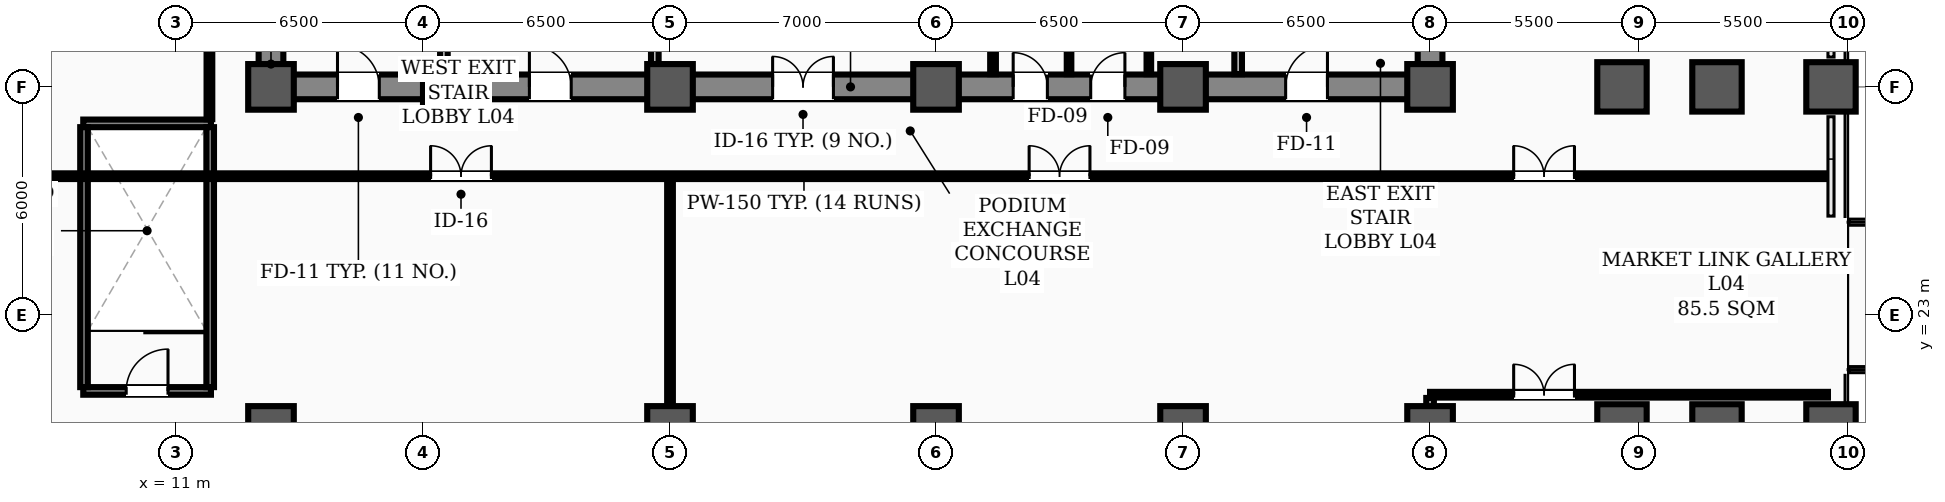
"""IFC4 building model, lengths in metres.
Left out: names, types, materials, properties, quantities, classifications, styles, units other than length and angle.
Written with IfcOpenShell. Run it as: python <this file> out.ifc"""

import sys

from ifc_helpers import new_model, si_unit, direction, frame, frame_2d, origin, origin_2d, place, context, subcontext, project, spatial, rectangle, hollow_rectangle, extrude, element, fill, save


model = new_model("IFC4")
c1 = context("Model", 3, precision=1e-05, world=origin(), true_north=direction((0.0, 1.0)))
c2 = subcontext(c1, "Body", "Model", "MODEL_VIEW")
j1 = project(units=[si_unit("LENGTHUNIT", "METRE"), si_unit("PLANEANGLEUNIT", "RADIAN")], contexts=[c1])
p1 = place(None, origin())
s1 = spatial("IfcSite", under=j1, at=p1, CompositionType="ELEMENT")
p2 = place(p1, origin())
s2 = spatial("IfcBuilding", under=s1, at=p2, CompositionType="ELEMENT")
p3 = place(p2, frame((0.0, 0.0, 16.6)))
s3 = spatial("IfcBuildingStorey", under=s2, at=p3, CompositionType="ELEMENT", Elevation=16.6)
for number, where, z_axis, x_axis in (
    (1, (13.5, 29.0, 0.0), (0.0, 0.0, 1.0), (1.0, 0.0, 0.0)),
    (2, (18.1, 29.0, 0.0), (0.0, 0.0, 1.0), (1.0, 0.0, 0.0)),
    (3, (24.0, 29.0, 0.0), (0.0, 0.0, 1.0), (1.0, 0.0, 0.0)),
    (4, (31.0, 29.0, 0.0), (0.0, 0.0, 1.0), (1.0, 0.0, 0.0)),
    (5, (37.5, 29.0, 0.0), (0.0, 0.0, 1.0), (1.0, 0.0, 0.0)),
    (6, (44.0, 29.0, 0.0), (0.0, 0.0, 1.0), (1.0, 0.0, 0.0)),
    (7, (13.5, 20.0, 0.0), (0.0, 0.0, 1.0), (1.0, 0.0, 0.0)),
    (8, (24.0, 20.0, 0.0), (0.0, 0.0, 1.0), (1.0, 0.0, 0.0)),
    (9, (31.0, 20.0, 0.0), (0.0, 0.0, 1.0), (1.0, 0.0, 0.0)),
    (10, (37.5, 20.0, 0.0), (0.0, 0.0, 1.0), (1.0, 0.0, 0.0)),
    (11, (44.0, 20.0, 0.0), (0.0, 0.0, 1.0), (1.0, 0.0, 0.0)),
):
    element("IfcColumn", number, at=place(p3, frame(where, z_axis=z_axis, x_axis=x_axis)), inside=s3, PredefinedType="COLUMN", context=c2, shape_type="SweptSolid", body=[
        extrude(hollow_rectangle(XDim=1.2, YDim=1.2, WallThickness=0.04, InnerFilletRadius=0.02, OuterFilletRadius=0.06, at=origin_2d()), origin(), (0.0, 0.0, 1.0), 5.4),
    ])
for number, where, z_axis, x_axis in (
    (12, (49.05, 20.0, 0.0), (0.0, 0.0, 1.0), (1.0, 0.0, 0.0)),
    (13, (49.05, 29.0, 0.0), (0.0, 0.0, 1.0), (1.0, 0.0, 0.0)),
    (14, (51.55, 20.0, 0.0), (0.0, 0.0, 1.0), (1.0, 0.0, 0.0)),
    (15, (51.55, 29.0, 0.0), (0.0, 0.0, 1.0), (1.0, 0.0, 0.0)),
):
    element("IfcColumn", number, at=place(p3, frame(where, z_axis=z_axis, x_axis=x_axis)), inside=s3, PredefinedType="COLUMN", context=c2, shape_type="SweptSolid", body=[
        extrude(rectangle(XDim=1.3, YDim=1.3, at=origin_2d()), origin(), (0.0, 0.0, 1.0), 5.4),
    ])
for number, where, z_axis, x_axis in (
    (16, (54.55, 20.0, 0.0), (0.0, 0.0, 1.0), (1.0, 0.0, 0.0)),
    (17, (54.55, 29.0, 0.0), (0.0, 0.0, 1.0), (1.0, 0.0, 0.0)),
):
    element("IfcColumn", number, at=place(p3, frame(where, z_axis=z_axis, x_axis=x_axis)), inside=s3, PredefinedType="COLUMN", context=c2, shape_type="SweptSolid", body=[
        extrude(rectangle(XDim=1.3, YDim=1.3, at=origin_2d()), origin(), (0.0, 0.0, 1.0), 5.16),
    ])
p4 = place(p3, frame((13.5, 29.0, 0.0), z_axis=(0.0, 0.0, 1.0), x_axis=(1.0, 0.0, 0.0)))
e18 = element("IfcWall", 18, at=p4, inside=s3, PredefinedType="SHEAR", context=c2, shape_type="SweptSolid", body=[
    extrude(rectangle(XDim=30.5, YDim=0.65, at=frame_2d((15.25, 0.0))), origin(), (0.0, 0.0, 1.0), 5.16),
])
p5 = place(p4, frame((1.75, 0.0, 0.0)))
e19 = element("IfcOpeningElement", 19, at=p5, cuts=e18, PredefinedType="OPENING", context=c2, shape_type="SweptSolid", body=[
    extrude(rectangle(XDim=1.1, YDim=2.08, at=frame_2d((0.55, 1.04))), frame((0.0, 0.335, 0.0), z_axis=(0.0, -1.0, 0.0), x_axis=(1.0, 0.0, 0.0)), (0.0, 0.0, 1.0), 0.67),
])
p6 = place(p4, frame((26.7, 0.0, 0.0)))
e20 = element("IfcOpeningElement", 20, at=p6, cuts=e18, PredefinedType="OPENING", context=c2, shape_type="SweptSolid", body=[
    extrude(rectangle(XDim=1.1, YDim=2.08, at=frame_2d((0.55, 1.04))), frame((0.0, 0.335, 0.0), z_axis=(0.0, -1.0, 0.0), x_axis=(1.0, 0.0, 0.0)), (0.0, 0.0, 1.0), 0.67),
])
p7 = place(p4, frame((6.8, 0.0, 0.0)))
e21 = element("IfcOpeningElement", 21, at=p7, cuts=e18, PredefinedType="OPENING", context=c2, shape_type="SweptSolid", body=[
    extrude(rectangle(XDim=1.1, YDim=2.08, at=frame_2d((0.55, 1.04))), frame((0.0, 0.335, 0.0), z_axis=(0.0, -1.0, 0.0), x_axis=(1.0, 0.0, 0.0)), (0.0, 0.0, 1.0), 0.67),
])
p8 = place(p4, frame((13.2, 0.0, 0.0)))
e22 = element("IfcOpeningElement", 22, at=p8, cuts=e18, PredefinedType="OPENING", context=c2, shape_type="SweptSolid", body=[
    extrude(rectangle(XDim=1.6, YDim=2.08, at=frame_2d((0.8, 1.04))), frame((0.0, 0.335, 0.0), z_axis=(0.0, -1.0, 0.0), x_axis=(1.0, 0.0, 0.0)), (0.0, 0.0, 1.0), 0.67),
])
p9 = place(p4, frame((19.53, 0.0, 0.0)))
e23 = element("IfcOpeningElement", 23, at=p9, cuts=e18, PredefinedType="OPENING", context=c2, shape_type="SweptSolid", body=[
    extrude(rectangle(XDim=0.9, YDim=2.08, at=frame_2d((0.45, 1.04))), frame((0.0, 0.335, 0.0), z_axis=(0.0, -1.0, 0.0), x_axis=(1.0, 0.0, 0.0)), (0.0, 0.0, 1.0), 0.67),
])
p10 = place(p4, frame((21.57, 0.0, 0.0)))
e24 = element("IfcOpeningElement", 24, at=p10, cuts=e18, PredefinedType="OPENING", context=c2, shape_type="SweptSolid", body=[
    extrude(rectangle(XDim=0.9, YDim=2.08, at=frame_2d((0.45, 1.04))), frame((0.0, 0.335, 0.0), z_axis=(0.0, -1.0, 0.0), x_axis=(1.0, 0.0, 0.0)), (0.0, 0.0, 1.0), 0.67),
])
for number, where, z_axis, x_axis in (
    (25, (13.5, 29.35, 0.0), (0.0, 0.0, 1.0), (0.0, 1.0, 0.0)),
    (26, (44.0, 29.35, 0.0), (0.0, 0.0, 1.0), (0.0, 1.0, 0.0)),
):
    element("IfcWall", number, at=place(p3, frame(where, z_axis=z_axis, x_axis=x_axis)), inside=s3, PredefinedType="SHEAR", context=c2, shape_type="SweptSolid", body=[
        extrude(rectangle(XDim=8.6, YDim=0.65, at=frame_2d((4.3, 0.0))), origin(), (0.0, 0.0, 1.0), 5.16),
    ])
p11 = place(p3, frame((8.56, 21.0, 0.0), z_axis=(0.0, 0.0, 1.0), x_axis=(1.0, 0.0, 0.0)))
e27 = element("IfcWall", 27, at=p11, inside=s3, PredefinedType="STANDARD", context=c2, shape_type="SweptSolid", body=[
    extrude(rectangle(XDim=3.36, YDim=0.2, at=frame_2d((1.68, 0.0))), origin(), (0.0, 0.0, 1.0), 5.16),
])
p12 = place(p11, frame((1.13, 0.0, 0.0)))
e28 = element("IfcOpeningElement", 28, at=p12, cuts=e27, PredefinedType="OPENING", context=c2, shape_type="SweptSolid", body=[
    extrude(rectangle(XDim=1.1, YDim=2.08, at=frame_2d((0.55, 1.04))), frame((0.0, 0.11, 0.0), z_axis=(0.0, -1.0, 0.0), x_axis=(1.0, 0.0, 0.0)), (0.0, 0.0, 1.0), 0.22),
])
p13 = place(p3, frame((8.56, 28.04, 0.0), z_axis=(0.0, 0.0, 1.0), x_axis=(1.0, 0.0, 0.0)))
e29 = element("IfcWall", 29, at=p13, inside=s3, PredefinedType="STANDARD", context=c2, shape_type="SweptSolid", body=[
    extrude(rectangle(XDim=3.36, YDim=0.2, at=frame_2d((1.68, 0.0))), origin(), (0.0, 0.0, 1.0), 5.16),
])
for number, where, z_axis, x_axis in (
    (30, (8.58, 21.1, 0.0), (0.0, 0.0, 1.0), (0.0, 1.0, 0.0)),
    (31, (11.9, 21.1, 0.0), (0.0, 0.0, 1.0), (0.0, 1.0, 0.0)),
):
    element("IfcWall", number, at=place(p3, frame(where, z_axis=z_axis, x_axis=x_axis)), inside=s3, PredefinedType="STANDARD", context=c2, shape_type="SweptSolid", body=[
        extrude(rectangle(XDim=6.84, YDim=0.2, at=frame_2d((3.42, 0.0))), origin(), (0.0, 0.0, 1.0), 5.16),
    ])
p14 = place(p3, frame((0.58, 26.65, 0.0), z_axis=(0.0, 0.0, 1.0), x_axis=(1.0, 0.0, 0.0)))
e32 = element("IfcWall", 32, at=p14, inside=s3, PredefinedType="PARTITIONING", context=c2, shape_type="SweptSolid", body=[
    extrude(rectangle(XDim=53.89, YDim=0.15, at=frame_2d((26.945, 0.0))), origin(), (0.0, 0.0, 1.0), 3.74),
])
p15 = place(p14, frame((17.12, 0.0, 0.0)))
e33 = element("IfcOpeningElement", 33, at=p15, cuts=e32, PredefinedType="OPENING", context=c2, shape_type="SweptSolid", body=[
    extrude(rectangle(XDim=1.6, YDim=2.08, at=frame_2d((0.8, 1.04))), frame((0.0, 0.085, 0.0), z_axis=(0.0, -1.0, 0.0), x_axis=(1.0, 0.0, 0.0)), (0.0, 0.0, 1.0), 0.17),
])
p16 = place(p14, frame((32.87, 0.0, 0.0)))
e34 = element("IfcOpeningElement", 34, at=p16, cuts=e32, PredefinedType="OPENING", context=c2, shape_type="SweptSolid", body=[
    extrude(rectangle(XDim=1.6, YDim=2.08, at=frame_2d((0.8, 1.04))), frame((0.0, 0.085, 0.0), z_axis=(0.0, -1.0, 0.0), x_axis=(1.0, 0.0, 0.0)), (0.0, 0.0, 1.0), 0.17),
])
p17 = place(p14, frame((45.62, 0.0, 0.0)))
e35 = element("IfcOpeningElement", 35, at=p17, cuts=e32, PredefinedType="OPENING", context=c2, shape_type="SweptSolid", body=[
    extrude(rectangle(XDim=1.6, YDim=2.08, at=frame_2d((0.8, 1.04))), frame((0.0, 0.085, 0.0), z_axis=(0.0, -1.0, 0.0), x_axis=(1.0, 0.0, 0.0)), (0.0, 0.0, 1.0), 0.17),
])
p18 = place(p3, frame((44.0, 20.9, 0.0), z_axis=(0.0, 0.0, 1.0), x_axis=(1.0, 0.0, 0.0)))
e36 = element("IfcWall", 36, at=p18, inside=s3, PredefinedType="PARTITIONING", context=c2, shape_type="SweptSolid", body=[
    extrude(rectangle(XDim=10.47, YDim=0.15, at=frame_2d((5.235, 0.0))), origin(), (0.0, 0.0, 1.0), 3.74),
])
p19 = place(p18, frame((2.2, 0.0, 0.0)))
e37 = element("IfcOpeningElement", 37, at=p19, cuts=e36, PredefinedType="OPENING", context=c2, shape_type="SweptSolid", body=[
    extrude(rectangle(XDim=1.6, YDim=2.08, at=frame_2d((0.8, 1.04))), frame((0.0, 0.085, 0.0), z_axis=(0.0, -1.0, 0.0), x_axis=(1.0, 0.0, 0.0)), (0.0, 0.0, 1.0), 0.17),
])
p20 = place(p3, frame((24.0, 3.53, 0.0), z_axis=(0.0, 0.0, 1.0), x_axis=(0.0, 1.0, 0.0)))
e38 = element("IfcWall", 38, at=p20, inside=s3, PredefinedType="PARTITIONING", context=c2, shape_type="SweptSolid", body=[
    extrude(rectangle(XDim=23.035, YDim=0.15, at=frame_2d((11.518, 0.0))), origin(), (0.0, 0.0, 1.0), 3.74),
])
p21 = place(p3, frame((44.0, 3.53, 0.0), z_axis=(0.0, 0.0, 1.0), x_axis=(0.0, 1.0, 0.0)))
e39 = element("IfcWall", 39, at=p21, inside=s3, PredefinedType="STANDARD", context=c2, shape_type="SweptSolid", body=[
    extrude(rectangle(XDim=17.285, YDim=0.2, at=frame_2d((8.643, 0.0))), origin(), (0.0, 0.0, 1.0), 3.74),
])
p22 = place(p3, frame((11.88, 28.15, 0.0), z_axis=(0.0, 0.0, 1.0), x_axis=(0.0, 1.0, 0.0)))
e40 = element("IfcWall", 40, at=p22, inside=s3, PredefinedType="PARTITIONING", context=c2, shape_type="SweptSolid", body=[
    extrude(rectangle(XDim=12.165, YDim=0.15, at=frame_2d((6.083, 0.0))), origin(), (0.0, 0.0, 1.0), 3.74),
])
for number, where, z_axis, x_axis in (
    (41, (18.05, 29.335, 0.0), (0.0, 0.0, 1.0), (0.0, 1.0, 0.0)),
    (42, (38.95, 29.335, 0.0), (0.0, 0.0, 1.0), (0.0, 1.0, 0.0)),
):
    element("IfcWall", number, at=place(p3, frame(where, z_axis=z_axis, x_axis=x_axis)), inside=s3, PredefinedType="STANDARD", context=c2, shape_type="SweptSolid", body=[
        extrude(rectangle(XDim=0.965, YDim=0.2, at=frame_2d((0.482, 0.0))), origin(), (0.0, 0.0, 1.0), 3.74),
    ])
p23 = place(p3, frame((23.6, 29.335, 0.0), z_axis=(0.0, 0.0, 1.0), x_axis=(0.0, 1.0, 0.0)))
e43 = element("IfcWall", 43, at=p23, inside=s3, PredefinedType="STANDARD", context=c2, shape_type="SweptSolid", body=[
    extrude(rectangle(XDim=5.365, YDim=0.2, at=frame_2d((2.683, 0.0))), origin(), (0.0, 0.0, 1.0), 3.74),
])
p24 = place(p3, frame((32.5, 29.335, 0.0), z_axis=(0.0, 0.0, 1.0), x_axis=(0.0, 1.0, 0.0)))
e44 = element("IfcWall", 44, at=p24, inside=s3, PredefinedType="PARTITIONING", context=c2, shape_type="SweptSolid", body=[
    extrude(rectangle(XDim=2.43, YDim=0.15, at=frame_2d((1.215, 0.0))), origin(), (0.0, 0.0, 1.0), 3.74),
])
for number, where, z_axis, x_axis in (
    (45, (36.6, 29.335, 0.0), (0.0, 0.0, 1.0), (0.0, 1.0, 0.0)),
    (46, (34.5, 29.335, 0.0), (0.0, 0.0, 1.0), (0.0, 1.0, 0.0)),
):
    element("IfcWall", number, at=place(p3, frame(where, z_axis=z_axis, x_axis=x_axis)), inside=s3, PredefinedType="PARTITIONING", context=c2, shape_type="SweptSolid", body=[
        extrude(rectangle(XDim=2.43, YDim=0.12, at=frame_2d((1.215, 0.0))), origin(), (0.0, 0.0, 1.0), 3.74),
    ])
p25 = place(p12, origin())
e47 = element("IfcDoor", 47, at=p25, inside=s3, OperationType="SINGLE_SWING_RIGHT", PredefinedType="DOOR", context=c2, shape_type="SweptSolid", body=[
    extrude(rectangle(XDim=1.1, YDim=2.08, at=frame_2d((0.55, 1.04))), frame((0.0, 0.025, 0.0), z_axis=(0.0, -1.0, 0.0), x_axis=(1.0, 0.0, 0.0)), (0.0, 0.0, 1.0), 0.05),
])
fill(e28, e47)
p26 = place(p15, origin())
e48 = element("IfcDoor", 48, at=p26, inside=s3, OperationType="DOUBLE_DOOR_SINGLE_SWING", PredefinedType="DOOR", context=c2, shape_type="SweptSolid", body=[
    extrude(rectangle(XDim=1.6, YDim=2.08, at=frame_2d((0.8, 1.04))), frame((0.0, 0.025, 0.0), z_axis=(0.0, -1.0, 0.0), x_axis=(1.0, 0.0, 0.0)), (0.0, 0.0, 1.0), 0.05),
])
fill(e33, e48)
p27 = place(p16, origin())
e49 = element("IfcDoor", 49, at=p27, inside=s3, OperationType="DOUBLE_DOOR_SINGLE_SWING", PredefinedType="DOOR", context=c2, shape_type="SweptSolid", body=[
    extrude(rectangle(XDim=1.6, YDim=2.08, at=frame_2d((0.8, 1.04))), frame((0.0, 0.025, 0.0), z_axis=(0.0, -1.0, 0.0), x_axis=(1.0, 0.0, 0.0)), (0.0, 0.0, 1.0), 0.05),
])
fill(e34, e49)
p28 = place(p19, origin())
e50 = element("IfcDoor", 50, at=p28, inside=s3, OperationType="DOUBLE_DOOR_SINGLE_SWING", PredefinedType="DOOR", context=c2, shape_type="SweptSolid", body=[
    extrude(rectangle(XDim=1.6, YDim=2.08, at=frame_2d((0.8, 1.04))), frame((0.0, 0.025, 0.0), z_axis=(0.0, -1.0, 0.0), x_axis=(1.0, 0.0, 0.0)), (0.0, 0.0, 1.0), 0.05),
])
fill(e37, e50)
p29 = place(p17, origin())
e51 = element("IfcDoor", 51, at=p29, inside=s3, OperationType="DOUBLE_DOOR_SINGLE_SWING", PredefinedType="DOOR", context=c2, shape_type="SweptSolid", body=[
    extrude(rectangle(XDim=1.6, YDim=2.08, at=frame_2d((0.8, 1.04))), frame((0.0, 0.025, 0.0), z_axis=(0.0, -1.0, 0.0), x_axis=(1.0, 0.0, 0.0)), (0.0, 0.0, 1.0), 0.05),
])
fill(e35, e51)
p30 = place(p5, origin())
e52 = element("IfcDoor", 52, at=p30, inside=s3, OperationType="SINGLE_SWING_LEFT", PredefinedType="DOOR", context=c2, shape_type="SweptSolid", body=[
    extrude(rectangle(XDim=1.1, YDim=2.08, at=frame_2d((0.55, 1.04))), frame((0.0, 0.025, 0.0), z_axis=(0.0, -1.0, 0.0), x_axis=(1.0, 0.0, 0.0)), (0.0, 0.0, 1.0), 0.05),
])
fill(e19, e52)
p31 = place(p6, origin())
e53 = element("IfcDoor", 53, at=p31, inside=s3, OperationType="SINGLE_SWING_RIGHT", PredefinedType="DOOR", context=c2, shape_type="SweptSolid", body=[
    extrude(rectangle(XDim=1.1, YDim=2.08, at=frame_2d((0.55, 1.04))), frame((0.0, 0.025, 0.0), z_axis=(0.0, -1.0, 0.0), x_axis=(1.0, 0.0, 0.0)), (0.0, 0.0, 1.0), 0.05),
])
fill(e20, e53)
p32 = place(p7, origin())
e54 = element("IfcDoor", 54, at=p32, inside=s3, OperationType="SINGLE_SWING_LEFT", PredefinedType="DOOR", context=c2, shape_type="SweptSolid", body=[
    extrude(rectangle(XDim=1.1, YDim=2.08, at=frame_2d((0.55, 1.04))), frame((0.0, 0.025, 0.0), z_axis=(0.0, -1.0, 0.0), x_axis=(1.0, 0.0, 0.0)), (0.0, 0.0, 1.0), 0.05),
])
fill(e21, e54)
p33 = place(p8, origin())
e55 = element("IfcDoor", 55, at=p33, inside=s3, OperationType="DOUBLE_DOOR_SINGLE_SWING", PredefinedType="DOOR", context=c2, shape_type="SweptSolid", body=[
    extrude(rectangle(XDim=1.6, YDim=2.08, at=frame_2d((0.8, 1.04))), frame((0.0, 0.025, 0.0), z_axis=(0.0, -1.0, 0.0), x_axis=(1.0, 0.0, 0.0)), (0.0, 0.0, 1.0), 0.05),
])
fill(e22, e55)
p34 = place(p9, origin())
e56 = element("IfcDoor", 56, at=p34, inside=s3, OperationType="SINGLE_SWING_LEFT", PredefinedType="DOOR", context=c2, shape_type="SweptSolid", body=[
    extrude(rectangle(XDim=0.9, YDim=2.08, at=frame_2d((0.45, 1.04))), frame((0.0, 0.025, 0.0), z_axis=(0.0, -1.0, 0.0), x_axis=(1.0, 0.0, 0.0)), (0.0, 0.0, 1.0), 0.05),
])
fill(e23, e56)
p35 = place(p10, origin())
e57 = element("IfcDoor", 57, at=p35, inside=s3, OperationType="SINGLE_SWING_RIGHT", PredefinedType="DOOR", context=c2, shape_type="SweptSolid", body=[
    extrude(rectangle(XDim=0.9, YDim=2.08, at=frame_2d((0.45, 1.04))), frame((0.0, 0.025, 0.0), z_axis=(0.0, -1.0, 0.0), x_axis=(1.0, 0.0, 0.0)), (0.0, 0.0, 1.0), 0.05),
])
fill(e24, e57)
save(model, sys.argv[1])
